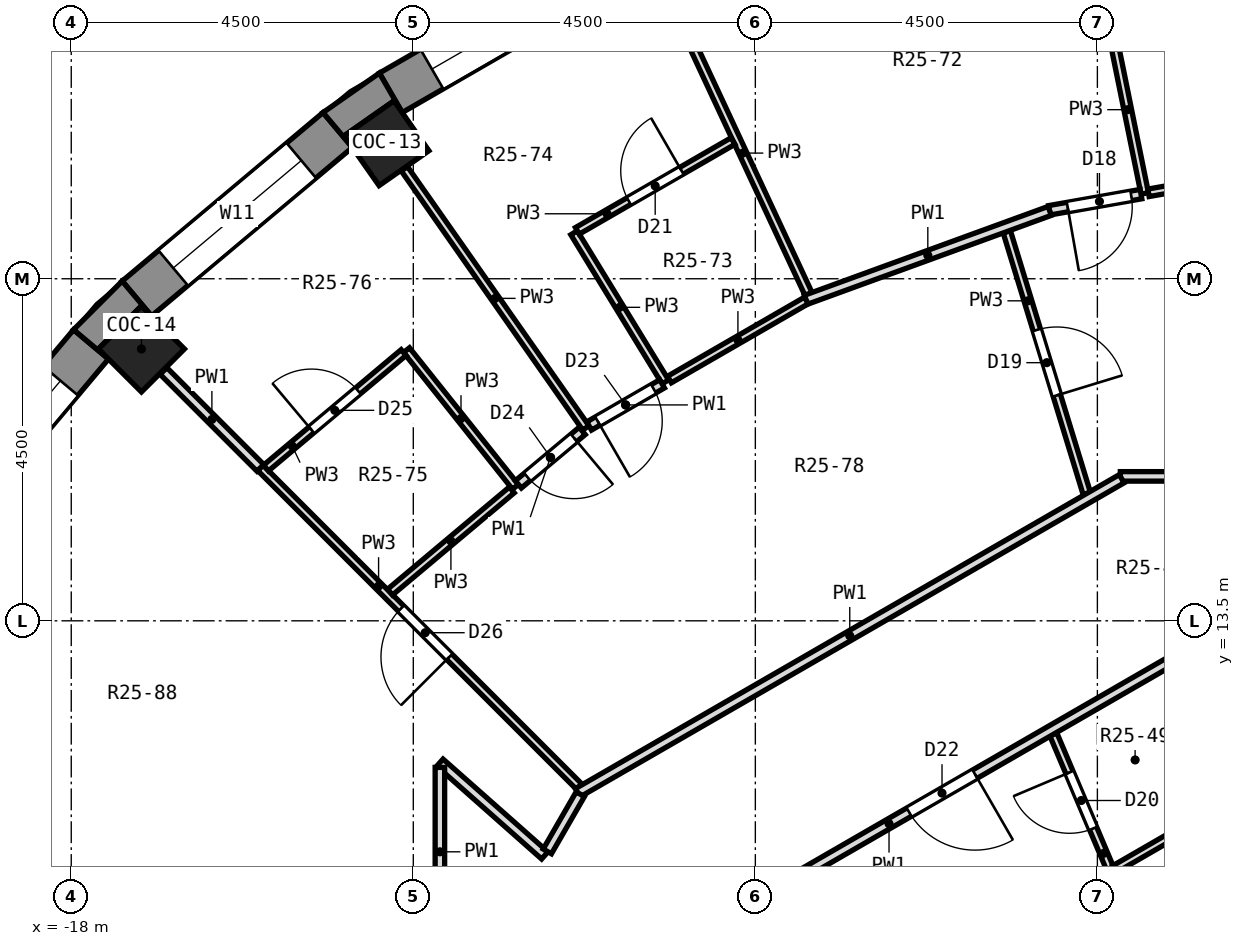
"""IFC4 building model, lengths in metres.
Left out: names, types, materials, properties, quantities, classifications, styles, units other than length and angle.
Written with IfcOpenShell. Run it as: python <this file> out.ifc"""

import sys

from ifc_helpers import new_model, si_unit, direction, frame, frame_2d, origin, origin_2d, place, context, subcontext, project, spatial, polyline, rectangle, outline, extrude, element, fill, save


model = new_model("IFC4")
c1 = context("Model", 3, precision=1e-05, world=origin(), true_north=direction((0.0, 1.0)))
c2 = subcontext(c1, "Body", "Model", "MODEL_VIEW")
j1 = project(units=[si_unit("LENGTHUNIT", "METRE"), si_unit("PLANEANGLEUNIT", "RADIAN")], contexts=[c1])
p1 = place(None, origin())
s1 = spatial("IfcSite", under=j1, at=p1, CompositionType="ELEMENT")
p2 = place(p1, origin())
s2 = spatial("IfcBuilding", under=s1, at=p2, CompositionType="ELEMENT")
p3 = place(p2, frame((0.0, 0.0, 160.8)))
s3 = spatial("IfcBuildingStorey", under=s2, at=p3, CompositionType="ELEMENT", Elevation=160.8)
for number, where, z_axis, x_axis in (
    (1, (-13.852, 19.782, 0.0), (0.0, 0.0, 1.0), (-0.574, 0.819, 0.0)),
    (2, (-17.077, 17.077, 0.0), (0.0, 0.0, 1.0), (-0.707, 0.707, 0.0)),
):
    element("IfcColumn", number, at=place(p3, frame(where, z_axis=z_axis, x_axis=x_axis)), inside=s3, PredefinedType="COLUMN", context=c2, shape_type="SweptSolid", body=[
        extrude(rectangle(XDim=0.8, YDim=0.8, at=origin_2d()), origin(), (0.0, 0.0, 1.0), 3.3),
    ])
p4 = place(p3, frame((-10.809, 22.171, 0.0), z_axis=(0.0, 0.0, 1.0), x_axis=(-0.86602648383, -0.499998129301, 0.0)))
e3 = element("IfcWall", 3, at=p4, inside=s3, PredefinedType="SOLIDWALL", context=c2, shape_type="SweptSolid", body=[
    extrude(rectangle(XDim=3.45, YDim=0.6, at=frame_2d((1.725, 0.0))), origin(), (0.0, 0.0, 1.0), 2.85),
])
p5 = place(p4, frame((0.625, 0.0, 0.9)))
e4 = element("IfcOpeningElement", 4, at=p5, cuts=e3, PredefinedType="OPENING", context=c2, shape_type="SweptSolid", body=[
    extrude(rectangle(XDim=2.2, YDim=1.8, at=frame_2d((1.1, 0.9))), frame((0.0, 0.312, 0.0), z_axis=(0.0, -1.0, 0.0), x_axis=(1.0, 0.0, 0.0)), (0.0, 0.0, 1.0), 0.624),
])
p6 = place(p3, frame((-14.494, 19.957, 0.0), z_axis=(0.0, 0.0, 1.0), x_axis=(-0.766058884809, -0.642770398358, 0.0)))
e5 = element("IfcWall", 5, at=p6, inside=s3, PredefinedType="SOLIDWALL", context=c2, shape_type="SweptSolid", body=[
    extrude(rectangle(XDim=3.449, YDim=0.6, at=frame_2d((1.725, 0.0))), origin(), (0.0, 0.0, 1.0), 2.85),
])
p7 = place(p6, frame((0.625, 0.0, 0.9)))
e6 = element("IfcOpeningElement", 6, at=p7, cuts=e5, PredefinedType="OPENING", context=c2, shape_type="SweptSolid", body=[
    extrude(rectangle(XDim=2.2, YDim=1.8, at=frame_2d((1.1, 0.9))), frame((0.0, 0.312, 0.0), z_axis=(0.0, -1.0, 0.0), x_axis=(1.0, 0.0, 0.0)), (0.0, 0.0, 1.0), 0.624),
])
p8 = place(p3, frame((-17.74, 17.137, 0.0), z_axis=(0.0, 0.0, 1.0), x_axis=(-0.642770398358, -0.766058884809, 0.0)))
e7 = element("IfcWall", 7, at=p8, inside=s3, PredefinedType="SOLIDWALL", context=c2, shape_type="SweptSolid", body=[
    extrude(rectangle(XDim=3.449, YDim=0.6, at=frame_2d((1.725, 0.0))), origin(), (0.0, 0.0, 1.0), 2.85),
])
p9 = place(p8, frame((0.625, 0.0, 0.9)))
e8 = element("IfcOpeningElement", 8, at=p9, cuts=e7, PredefinedType="OPENING", context=c2, shape_type="SweptSolid", body=[
    extrude(rectangle(XDim=2.2, YDim=1.8, at=frame_2d((1.1, 0.9))), frame((0.0, 0.312, 0.0), z_axis=(0.0, -1.0, 0.0), x_axis=(1.0, 0.0, 0.0)), (0.0, 0.0, 1.0), 0.624),
])
p10 = place(p3, origin())
e9 = element("IfcWall", 9, at=p10, inside=s3, PredefinedType="SOLIDWALL", context=c2, shape_type="SweptSolid", body=[
    extrude(outline(polyline([(-13.946, 20.706), (-14.687, 20.187), (-14.302, 19.727), (-14.409, 19.881), (-13.754, 20.34), (-13.646, 20.186), (-13.946, 20.706)])), origin(), (0.0, 0.0, 1.0), 2.85),
])
p11 = place(p3, origin())
e10 = element("IfcWall", 10, at=p11, inside=s3, PredefinedType="SOLIDWALL", context=c2, shape_type="SweptSolid", body=[
    extrude(outline(polyline([(-17.969, 17.33), (-17.51, 16.944), (-17.642, 17.077), (-17.077, 17.642), (-16.944, 17.51), (-17.33, 17.969), (-17.969, 17.33)])), origin(), (0.0, 0.0, 1.0), 2.85),
])
p12 = place(p3, frame((-4.325, 21.327, 0.0), z_axis=(0.0, 0.0, 1.0), x_axis=(0.199120171805, -0.979975079877, 0.0)))
e11 = element("IfcWall", 11, at=p12, inside=s3, PredefinedType="PARTITIONING", context=c2, shape_type="SweptSolid", body=[
    extrude(rectangle(XDim=2.25, YDim=0.1, at=frame_2d((1.125, 0.0))), origin(), (0.0, 0.0, 1.0), 2.85),
])
p13 = place(p3, frame((-5.692, 18.618, 0.0), z_axis=(0.0, 0.0, 1.0), x_axis=(0.292189255633, -0.956360517218, 0.0)))
e12 = element("IfcWall", 12, at=p13, inside=s3, PredefinedType="PARTITIONING", context=c2, shape_type="SweptSolid", body=[
    extrude(rectangle(XDim=3.601, YDim=0.1, at=frame_2d((1.801, 0.0))), origin(), (0.0, 0.0, 1.0), 2.85),
])
p14 = place(p13, frame((1.351, 0.0, 0.0)))
e13 = element("IfcOpeningElement", 13, at=p14, cuts=e12, PredefinedType="OPENING", context=c2, shape_type="SweptSolid", body=[
    extrude(rectangle(XDim=0.9, YDim=2.1, at=frame_2d((0.45, 1.05))), frame((0.0, 0.062, 0.0), z_axis=(0.0, -1.0, 0.0), x_axis=(1.0, 0.0, 0.0)), (0.0, 0.0, 1.0), 0.124),
])
p15 = place(p3, frame((-5.08, 12.006, 0.0), z_axis=(0.0, 0.0, 1.0), x_axis=(0.389493140841, -0.92102936611, 0.0)))
e14 = element("IfcWall", 14, at=p15, inside=s3, PredefinedType="PARTITIONING", context=c2, shape_type="SweptSolid", body=[
    extrude(rectangle(XDim=1.953, YDim=0.1, at=frame_2d((0.976, 0.0))), origin(), (0.0, 0.0, 1.0), 2.85),
])
p16 = place(p15, frame((0.545, 0.0, 0.0)))
e15 = element("IfcOpeningElement", 15, at=p16, cuts=e14, PredefinedType="OPENING", context=c2, shape_type="SweptSolid", body=[
    extrude(rectangle(XDim=0.8, YDim=2.1, at=frame_2d((0.4, 1.05))), frame((0.0, 0.062, 0.0), z_axis=(0.0, -1.0, 0.0), x_axis=(1.0, 0.0, 0.0)), (0.0, 0.0, 1.0), 0.124),
])
p17 = place(p3, frame((-10.032, 21.516, 0.0), z_axis=(0.0, 0.0, 1.0), x_axis=(0.422407439585, -0.906406065173, 0.0)))
e16 = element("IfcWall", 16, at=p17, inside=s3, PredefinedType="PARTITIONING", context=c2, shape_type="SweptSolid", body=[
    extrude(rectangle(XDim=4.111, YDim=0.1, at=frame_2d((2.055, 0.0))), origin(), (0.0, 0.0, 1.0), 2.85),
])
p18 = place(p3, frame((-11.385, 18.605, 0.0), z_axis=(0.0, 0.0, 1.0), x_axis=(0.522076659847, -0.852898564451, 0.0)))
e17 = element("IfcWall", 17, at=p18, inside=s3, PredefinedType="PARTITIONING", context=c2, shape_type="SweptSolid", body=[
    extrude(rectangle(XDim=2.3, YDim=0.1, at=frame_2d((1.15, 0.0))), origin(), (0.0, 0.0, 1.0), 2.85),
])
p19 = place(p3, frame((-13.617, 19.447, 0.0), z_axis=(0.0, 0.0, 1.0), x_axis=(0.573631652668, -0.819113378634, 0.0)))
e18 = element("IfcWall", 18, at=p19, inside=s3, PredefinedType="PARTITIONING", context=c2, shape_type="SweptSolid", body=[
    extrude(rectangle(XDim=4.161, YDim=0.1, at=frame_2d((2.081, 0.0))), origin(), (0.0, 0.0, 1.0), 2.85),
])
p20 = place(p3, frame((-13.589, 17.061, 0.0), z_axis=(0.0, 0.0, 1.0), x_axis=(0.623062698495, -0.782171895266, 0.0)))
e19 = element("IfcWall", 19, at=p20, inside=s3, PredefinedType="PARTITIONING", context=c2, shape_type="SweptSolid", body=[
    extrude(rectangle(XDim=2.3, YDim=0.1, at=frame_2d((1.15, 0.0))), origin(), (0.0, 0.0, 1.0), 2.85),
])
p21 = place(p3, frame((-15.512, 15.512, 0.0), z_axis=(0.0, 0.0, 1.0), x_axis=(0.707106781187, -0.707106781187, 0.0)))
e20 = element("IfcWall", 20, at=p21, inside=s3, PredefinedType="PARTITIONING", context=c2, shape_type="SweptSolid", body=[
    extrude(rectangle(XDim=5.931, YDim=0.1, at=frame_2d((2.966, 0.0))), origin(), (0.0, 0.0, 1.0), 2.85),
])
p22 = place(p21, frame((2.617, 0.0, 0.0)))
e21 = element("IfcOpeningElement", 21, at=p22, cuts=e20, PredefinedType="OPENING", context=c2, shape_type="SweptSolid", body=[
    extrude(rectangle(XDim=0.9, YDim=2.1, at=frame_2d((0.45, 1.05))), frame((0.0, 0.062, 0.0), z_axis=(0.0, -1.0, 0.0), x_axis=(1.0, 0.0, 0.0)), (0.0, 0.0, 1.0), 0.124),
])
p23 = place(p3, frame((-16.787, 16.787, 0.0), z_axis=(0.0, 0.0, 1.0), x_axis=(0.707106781187, -0.707106781187, 0.0)))
e22 = element("IfcWall", 22, at=p23, inside=s3, PredefinedType="PARTITIONING", context=c2, shape_type="SweptSolid", body=[
    extrude(rectangle(XDim=1.802, YDim=0.125, at=frame_2d((0.901, 0.0))), origin(), (0.0, 0.0, 1.0), 2.85),
])
p24 = place(p3, frame((-13.15, 11.634, 0.0), z_axis=(0.0, 0.0, 1.0), x_axis=(0.748920683101, -0.662659649008, 0.0)))
e23 = element("IfcWall", 23, at=p24, inside=s3, PredefinedType="PARTITIONING", context=c2, shape_type="SweptSolid", body=[
    extrude(rectangle(XDim=1.843, YDim=0.125, at=frame_2d((0.921, 0.0))), origin(), (0.0, 0.0, 1.0), 2.85),
])
p25 = place(p3, frame((-4.198, 15.4, 0.0), z_axis=(0.0, 0.0, 1.0), x_axis=(1.0, 0.0, 0.0)))
e24 = element("IfcWall", 24, at=p25, inside=s3, PredefinedType="PARTITIONING", context=c2, shape_type="SweptSolid", body=[
    extrude(rectangle(XDim=8.262, YDim=0.125, at=frame_2d((4.131, 0.0))), origin(), (0.0, 0.0, 1.0), 2.85),
])
p26 = place(p3, frame((-3.828, 19.131, 0.0), z_axis=(0.0, 0.0, 1.0), x_axis=(0.984788229358, 0.173758865439, 0.0)))
e25 = element("IfcWall", 25, at=p26, inside=s3, PredefinedType="PARTITIONING", context=c2, shape_type="SweptSolid", body=[
    extrude(rectangle(XDim=2.105, YDim=0.1, at=frame_2d((1.052, 0.0))), origin(), (0.0, 0.0, 1.0), 2.85),
])
p27 = place(p3, frame((-5.131, 18.901, 0.0), z_axis=(0.0, 0.0, 1.0), x_axis=(0.984767477139, 0.173876438798, 0.0)))
e26 = element("IfcWall", 26, at=p27, inside=s3, PredefinedType="PARTITIONING", context=c2, shape_type="SweptSolid", body=[
    extrude(rectangle(XDim=1.223, YDim=0.125, at=frame_2d((0.611, 0.0))), origin(), (0.0, 0.0, 1.0), 2.85),
])
p28 = place(p27, frame((0.243, 0.0, 0.0)))
e27 = element("IfcOpeningElement", 27, at=p28, cuts=e26, PredefinedType="OPENING", context=c2, shape_type="SweptSolid", body=[
    extrude(rectangle(XDim=0.85, YDim=2.1, at=frame_2d((0.425, 1.05))), frame((0.0, 0.074, 0.0), z_axis=(0.0, -1.0, 0.0), x_axis=(1.0, 0.0, 0.0)), (0.0, 0.0, 1.0), 0.149),
])
p29 = place(p3, frame((-8.335, 17.723, 0.0), z_axis=(0.0, 0.0, 1.0), x_axis=(0.939542594009, 0.342432057556, 0.0)))
e28 = element("IfcWall", 28, at=p29, inside=s3, PredefinedType="PARTITIONING", context=c2, shape_type="SweptSolid", body=[
    extrude(rectangle(XDim=3.414, YDim=0.125, at=frame_2d((1.707, 0.0))), origin(), (0.0, 0.0, 1.0), 2.85),
])
p30 = place(p3, frame((-4.276, 10.233, 0.0), z_axis=(0.0, 0.0, 1.0), x_axis=(0.866051847062, 0.499954196102, 0.0)))
e29 = element("IfcWall", 29, at=p30, inside=s3, PredefinedType="PARTITIONING", context=c2, shape_type="SweptSolid", body=[
    extrude(rectangle(XDim=1.459, YDim=0.1, at=frame_2d((0.729, 0.0))), origin(), (0.0, 0.0, 1.0), 2.85),
])
p31 = place(p3, frame((-9.58, 9.481, 0.0), z_axis=(0.0, 0.0, 1.0), x_axis=(0.866086354705, 0.499894415045, 0.0)))
e30 = element("IfcWall", 30, at=p31, inside=s3, PredefinedType="PARTITIONING", context=c2, shape_type="SweptSolid", body=[
    extrude(rectangle(XDim=6.964, YDim=0.125, at=frame_2d((3.482, 0.0))), origin(), (0.0, 0.0, 1.0), 2.85),
])
p32 = place(p31, frame((3.005, 0.0, 0.0)))
e31 = element("IfcOpeningElement", 31, at=p32, cuts=e30, PredefinedType="OPENING", context=c2, shape_type="SweptSolid", body=[
    extrude(rectangle(XDim=1.0, YDim=2.1, at=frame_2d((0.5, 1.05))), frame((0.0, 0.074, 0.0), z_axis=(0.0, -1.0, 0.0), x_axis=(1.0, 0.0, 0.0)), (0.0, 0.0, 1.0), 0.149),
])
p33 = place(p3, frame((-11.336, 11.238, 0.0), z_axis=(0.0, 0.0, 1.0), x_axis=(0.866067506982, 0.499927068031, 0.0)))
e32 = element("IfcWall", 32, at=p33, inside=s3, PredefinedType="PARTITIONING", context=c2, shape_type="SweptSolid", body=[
    extrude(rectangle(XDim=8.263, YDim=0.125, at=frame_2d((4.131, 0.0))), origin(), (0.0, 0.0, 1.0), 2.85),
])
p34 = place(p3, frame((-11.187, 16.063, 0.0), z_axis=(0.0, 0.0, 1.0), x_axis=(0.865888396158, 0.500237229121, 0.0)))
e33 = element("IfcWall", 33, at=p34, inside=s3, PredefinedType="PARTITIONING", context=c2, shape_type="SweptSolid", body=[
    extrude(rectangle(XDim=1.108, YDim=0.125, at=frame_2d((0.554, 0.0))), origin(), (0.0, 0.0, 1.0), 2.85),
])
p35 = place(p34, frame((0.129, 0.0, 0.0)))
e34 = element("IfcOpeningElement", 34, at=p35, cuts=e33, PredefinedType="OPENING", context=c2, shape_type="SweptSolid", body=[
    extrude(rectangle(XDim=0.85, YDim=2.1, at=frame_2d((0.425, 1.05))), frame((0.0, 0.074, 0.0), z_axis=(0.0, -1.0, 0.0), x_axis=(1.0, 0.0, 0.0)), (0.0, 0.0, 1.0), 0.149),
])
p36 = place(p3, frame((-10.13, 16.674, 0.0), z_axis=(0.0, 0.0, 1.0), x_axis=(0.866052632827, 0.499952834948, 0.0)))
e35 = element("IfcWall", 35, at=p36, inside=s3, PredefinedType="PARTITIONING", context=c2, shape_type="SweptSolid", body=[
    extrude(rectangle(XDim=2.079, YDim=0.1, at=frame_2d((1.04, 0.0))), origin(), (0.0, 0.0, 1.0), 2.85),
])
p37 = place(p3, frame((-11.342, 18.63, 0.0), z_axis=(0.0, 0.0, 1.0), x_axis=(0.866139183788, 0.49980287545, 0.0)))
e36 = element("IfcWall", 36, at=p37, inside=s3, PredefinedType="PARTITIONING", context=c2, shape_type="SweptSolid", body=[
    extrude(rectangle(XDim=2.365, YDim=0.1, at=frame_2d((1.183, 0.0))), origin(), (0.0, 0.0, 1.0), 2.85),
])
p38 = place(p37, frame((0.782, 0.0, 0.0)))
e37 = element("IfcOpeningElement", 37, at=p38, cuts=e36, PredefinedType="OPENING", context=c2, shape_type="SweptSolid", body=[
    extrude(rectangle(XDim=0.8, YDim=2.1, at=frame_2d((0.4, 1.05))), frame((0.0, 0.062, 0.0), z_axis=(0.0, -1.0, 0.0), x_axis=(1.0, 0.0, 0.0)), (0.0, 0.0, 1.0), 0.124),
])
p39 = place(p3, frame((-12.118, 15.294, 0.0), z_axis=(0.0, 0.0, 1.0), x_axis=(0.766831623153, 0.641848316764, 0.0)))
e38 = element("IfcWall", 38, at=p39, inside=s3, PredefinedType="PARTITIONING", context=c2, shape_type="SweptSolid", body=[
    extrude(rectangle(XDim=1.096, YDim=0.125, at=frame_2d((0.548, 0.0))), origin(), (0.0, 0.0, 1.0), 2.85),
])
p40 = place(p39, frame((0.154, 0.0, 0.0)))
e39 = element("IfcOpeningElement", 39, at=p40, cuts=e38, PredefinedType="OPENING", context=c2, shape_type="SweptSolid", body=[
    extrude(rectangle(XDim=0.8, YDim=2.1, at=frame_2d((0.4, 1.05))), frame((0.0, 0.074, 0.0), z_axis=(0.0, -1.0, 0.0), x_axis=(1.0, 0.0, 0.0)), (0.0, 0.0, 1.0), 0.149),
])
p41 = place(p3, frame((-13.806, 13.877, 0.0), z_axis=(0.0, 0.0, 1.0), x_axis=(0.766093288455, 0.64272939359, 0.0)))
e40 = element("IfcWall", 40, at=p41, inside=s3, PredefinedType="PARTITIONING", context=c2, shape_type="SweptSolid", body=[
    extrude(rectangle(XDim=2.092, YDim=0.1, at=frame_2d((1.046, 0.0))), origin(), (0.0, 0.0, 1.0), 2.85),
])
p42 = place(p3, frame((-15.438, 15.51, 0.0), z_axis=(0.0, 0.0, 1.0), x_axis=(0.766091436164, 0.642731601399, 0.0)))
e41 = element("IfcWall", 41, at=p42, inside=s3, PredefinedType="PARTITIONING", context=c2, shape_type="SweptSolid", body=[
    extrude(rectangle(XDim=2.363, YDim=0.1, at=frame_2d((1.182, 0.0))), origin(), (0.0, 0.0, 1.0), 2.85),
])
p43 = place(p42, frame((0.781, 0.0, 0.0)))
e42 = element("IfcOpeningElement", 42, at=p43, cuts=e41, PredefinedType="OPENING", context=c2, shape_type="SweptSolid", body=[
    extrude(rectangle(XDim=0.8, YDim=2.1, at=frame_2d((0.4, 1.05))), frame((0.0, 0.062, 0.0), z_axis=(0.0, -1.0, 0.0), x_axis=(1.0, 0.0, 0.0)), (0.0, 0.0, 1.0), 0.124),
])
p44 = place(p3, frame((-11.737, 10.466, 0.0), z_axis=(0.0, 0.0, 1.0), x_axis=(0.49949531882, 0.866316585595, 0.0)))
e43 = element("IfcWall", 43, at=p44, inside=s3, PredefinedType="PARTITIONING", context=c2, shape_type="SweptSolid", body=[
    extrude(rectangle(XDim=0.869, YDim=0.125, at=frame_2d((0.434, 0.0))), origin(), (0.0, 0.0, 1.0), 2.85),
])
p45 = place(p3, frame((-13.15, 9.35, 0.0), z_axis=(0.0, 0.0, 1.0), x_axis=(0.0, 1.0, 0.0)))
e44 = element("IfcWall", 44, at=p45, inside=s3, PredefinedType="PARTITIONING", context=c2, shape_type="SweptSolid", body=[
    extrude(rectangle(XDim=2.221, YDim=0.125, at=frame_2d((1.111, 0.0))), origin(), (0.0, 0.0, 1.0), 2.85),
])
p46 = place(p5, origin())
e45 = element("IfcWindow", 45, at=p46, inside=s3, PartitioningType="SINGLE_PANEL", PredefinedType="WINDOW", context=c2, shape_type="SweptSolid", body=[
    extrude(rectangle(XDim=2.2, YDim=1.8, at=frame_2d((1.1, 0.9))), frame((0.0, 0.18, 0.0), z_axis=(0.0, -1.0, 0.0), x_axis=(1.0, 0.0, 0.0)), (0.0, 0.0, 1.0), 0.06),
])
fill(e4, e45)
p47 = place(p7, origin())
e46 = element("IfcWindow", 46, at=p47, inside=s3, PartitioningType="SINGLE_PANEL", PredefinedType="WINDOW", context=c2, shape_type="SweptSolid", body=[
    extrude(rectangle(XDim=2.2, YDim=1.8, at=frame_2d((1.1, 0.9))), frame((0.0, 0.18, 0.0), z_axis=(0.0, -1.0, 0.0), x_axis=(1.0, 0.0, 0.0)), (0.0, 0.0, 1.0), 0.06),
])
fill(e6, e46)
p48 = place(p9, origin())
e47 = element("IfcWindow", 47, at=p48, inside=s3, PartitioningType="SINGLE_PANEL", PredefinedType="WINDOW", context=c2, shape_type="SweptSolid", body=[
    extrude(rectangle(XDim=2.2, YDim=1.8, at=frame_2d((1.1, 0.9))), frame((0.0, 0.18, 0.0), z_axis=(0.0, -1.0, 0.0), x_axis=(1.0, 0.0, 0.0)), (0.0, 0.0, 1.0), 0.06),
])
fill(e8, e47)
p49 = place(p28, frame((0.85, 0.0, 0.0), z_axis=(0.0, 0.0, 1.0), x_axis=(-1.0, 0.0, 0.0)))
e48 = element("IfcDoor", 48, at=p49, inside=s3, OperationType="SINGLE_SWING_RIGHT", PredefinedType="DOOR", context=c2, shape_type="SweptSolid", body=[
    extrude(rectangle(XDim=0.85, YDim=2.1, at=frame_2d((0.425, 1.05))), frame((0.0, 0.025, 0.0), z_axis=(0.0, -1.0, 0.0), x_axis=(1.0, 0.0, 0.0)), (0.0, 0.0, 1.0), 0.05),
])
fill(e27, e48)
p50 = place(p14, origin())
e49 = element("IfcDoor", 49, at=p50, inside=s3, OperationType="SINGLE_SWING_RIGHT", PredefinedType="DOOR", context=c2, shape_type="SweptSolid", body=[
    extrude(rectangle(XDim=0.9, YDim=2.1, at=frame_2d((0.45, 1.05))), frame((0.0, 0.025, 0.0), z_axis=(0.0, -1.0, 0.0), x_axis=(1.0, 0.0, 0.0)), (0.0, 0.0, 1.0), 0.05),
])
fill(e13, e49)
p51 = place(p16, frame((0.8, 0.0, 0.0), z_axis=(0.0, 0.0, 1.0), x_axis=(-1.0, 0.0, 0.0)))
e50 = element("IfcDoor", 50, at=p51, inside=s3, OperationType="SINGLE_SWING_RIGHT", PredefinedType="DOOR", context=c2, shape_type="SweptSolid", body=[
    extrude(rectangle(XDim=0.8, YDim=2.1, at=frame_2d((0.4, 1.05))), frame((0.0, 0.025, 0.0), z_axis=(0.0, -1.0, 0.0), x_axis=(1.0, 0.0, 0.0)), (0.0, 0.0, 1.0), 0.05),
])
fill(e15, e50)
p52 = place(p38, origin())
e51 = element("IfcDoor", 51, at=p52, inside=s3, OperationType="SINGLE_SWING_RIGHT", PredefinedType="DOOR", context=c2, shape_type="SweptSolid", body=[
    extrude(rectangle(XDim=0.8, YDim=2.1, at=frame_2d((0.4, 1.05))), frame((0.0, 0.025, 0.0), z_axis=(0.0, -1.0, 0.0), x_axis=(1.0, 0.0, 0.0)), (0.0, 0.0, 1.0), 0.05),
])
fill(e37, e51)
p53 = place(p32, frame((1.0, 0.0, 0.0), z_axis=(0.0, 0.0, 1.0), x_axis=(-1.0, 0.0, 0.0)))
e52 = element("IfcDoor", 52, at=p53, inside=s3, OperationType="SINGLE_SWING_LEFT", PredefinedType="DOOR", context=c2, shape_type="SweptSolid", body=[
    extrude(rectangle(XDim=1.0, YDim=2.1, at=frame_2d((0.5, 1.05))), frame((0.0, 0.025, 0.0), z_axis=(0.0, -1.0, 0.0), x_axis=(1.0, 0.0, 0.0)), (0.0, 0.0, 1.0), 0.05),
])
fill(e31, e52)
p54 = place(p35, frame((0.85, 0.0, 0.0), z_axis=(0.0, 0.0, 1.0), x_axis=(-1.0, 0.0, 0.0)))
e53 = element("IfcDoor", 53, at=p54, inside=s3, OperationType="SINGLE_SWING_RIGHT", PredefinedType="DOOR", context=c2, shape_type="SweptSolid", body=[
    extrude(rectangle(XDim=0.85, YDim=2.1, at=frame_2d((0.425, 1.05))), frame((0.0, 0.025, 0.0), z_axis=(0.0, -1.0, 0.0), x_axis=(1.0, 0.0, 0.0)), (0.0, 0.0, 1.0), 0.05),
])
fill(e34, e53)
p55 = place(p40, frame((0.8, 0.0, 0.0), z_axis=(0.0, 0.0, 1.0), x_axis=(-1.0, 0.0, 0.0)))
e54 = element("IfcDoor", 54, at=p55, inside=s3, OperationType="SINGLE_SWING_LEFT", PredefinedType="DOOR", context=c2, shape_type="SweptSolid", body=[
    extrude(rectangle(XDim=0.8, YDim=2.1, at=frame_2d((0.4, 1.05))), frame((0.0, 0.025, 0.0), z_axis=(0.0, -1.0, 0.0), x_axis=(1.0, 0.0, 0.0)), (0.0, 0.0, 1.0), 0.05),
])
fill(e39, e54)
p56 = place(p43, origin())
e55 = element("IfcDoor", 55, at=p56, inside=s3, OperationType="SINGLE_SWING_LEFT", PredefinedType="DOOR", context=c2, shape_type="SweptSolid", body=[
    extrude(rectangle(XDim=0.8, YDim=2.1, at=frame_2d((0.4, 1.05))), frame((0.0, 0.025, 0.0), z_axis=(0.0, -1.0, 0.0), x_axis=(1.0, 0.0, 0.0)), (0.0, 0.0, 1.0), 0.05),
])
fill(e42, e55)
p57 = place(p22, frame((0.9, 0.0, 0.0), z_axis=(0.0, 0.0, 1.0), x_axis=(-1.0, 0.0, 0.0)))
e56 = element("IfcDoor", 56, at=p57, inside=s3, OperationType="SINGLE_SWING_LEFT", PredefinedType="DOOR", context=c2, shape_type="SweptSolid", body=[
    extrude(rectangle(XDim=0.9, YDim=2.1, at=frame_2d((0.45, 1.05))), frame((0.0, 0.025, 0.0), z_axis=(0.0, -1.0, 0.0), x_axis=(1.0, 0.0, 0.0)), (0.0, 0.0, 1.0), 0.05),
])
fill(e21, e56)
save(model, sys.argv[1])
